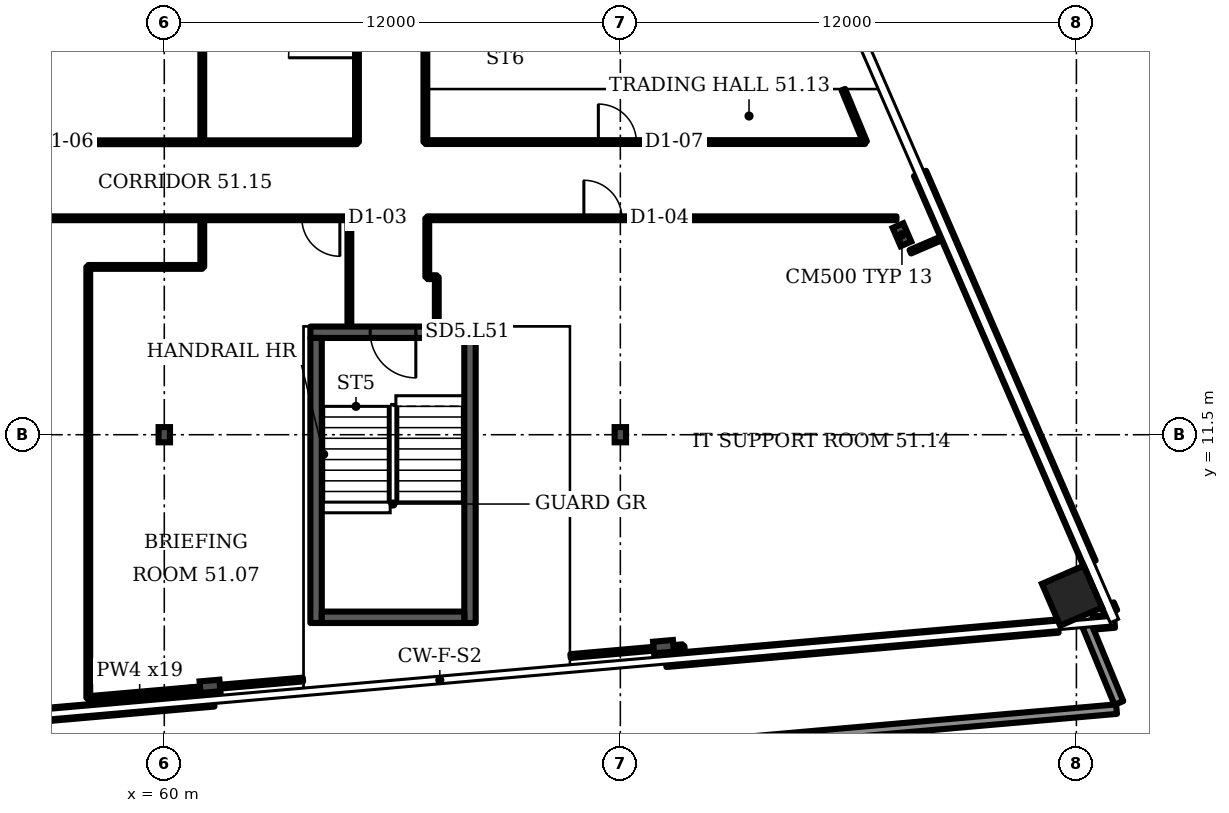
"""IFC4 building model, lengths in metres.
Left out: names, types, materials, properties, quantities, classifications, styles, units other than length and angle.
Written with IfcOpenShell. Run it as: python <this file> out.ifc"""

import sys

from ifc_helpers import new_model, si_unit, direction, frame, frame_2d, origin, origin_2d, place, context, subcontext, project, spatial, rectangle, i_section, extrude, element, fill, save


model = new_model("IFC4")
c1 = context("Model", 3, precision=1e-05, world=origin(), true_north=direction((0.0, 1.0)))
c2 = subcontext(c1, "Body", "Model", "MODEL_VIEW")
j1 = project(units=[si_unit("LENGTHUNIT", "METRE"), si_unit("PLANEANGLEUNIT", "RADIAN")], contexts=[c1])
p1 = place(None, origin())
s1 = spatial("IfcSite", under=j1, at=p1, CompositionType="ELEMENT")
p2 = place(p1, origin())
s2 = spatial("IfcBuilding", under=s1, at=p2, CompositionType="ELEMENT")
p3 = place(p2, frame((0.0, 0.0, 207.1)))
s3 = spatial("IfcBuildingStorey", under=s2, at=p3, CompositionType="ELEMENT", Elevation=207.1)
p4 = place(p3, frame((83.883, 7.265, 0.0), z_axis=(0.0, 0.0, 1.0), x_axis=(-0.398727, 0.917072, 0.0)))
e1 = element("IfcColumn", 1, at=p4, inside=s3, PredefinedType="COLUMN", context=c2, shape_type="SweptSolid", body=[
    extrude(rectangle(XDim=1.2, YDim=1.2, at=origin_2d()), origin(), (0.0, 0.0, 1.0), 3.6),
])
for number, where, z_axis, x_axis in (
    (2, (61.202, 4.879, 0.0), (0.0, 0.0, 1.0), (0.087, -0.996, 0.0)),
    (3, (73.135, 5.923, 0.0), (0.0, 0.0, 1.0), (0.087, -0.996, 0.0)),
    (4, (79.41, 16.762, 0.0), (0.0, 0.0, 1.0), (0.917, 0.399, 0.0)),
):
    element("IfcColumn", number, at=place(p3, frame(where, z_axis=z_axis, x_axis=x_axis)), inside=s3, PredefinedType="COLUMN", context=c2, shape_type="SweptSolid", body=[
        extrude(i_section(OverallWidth=0.306, OverallDepth=0.524, WebThickness=0.021, FlangeThickness=0.04, FilletRadius=0.027, at=origin_2d()), origin(), (0.0, 0.0, 1.0), 3.6),
    ])
for number, where, z_axis, x_axis in (
    (5, (60.0, 11.5, 0.0), (0.0, 0.0, 1.0), (1.0, 0.0, 0.0)),
    (6, (72.0, 11.5, 0.0), (0.0, 0.0, 1.0), (1.0, 0.0, 0.0)),
):
    element("IfcColumn", number, at=place(p3, frame(where, z_axis=z_axis, x_axis=x_axis)), inside=s3, PredefinedType="COLUMN", context=c2, shape_type="SweptSolid", body=[
        extrude(i_section(OverallWidth=0.3, OverallDepth=0.4, WebThickness=0.013, FlangeThickness=0.024, FilletRadius=0.027, at=origin_2d()), origin(), (0.0, 0.0, 1.0), 3.6),
    ])
p5 = place(p3, frame((85.056, 4.28, 0.0), z_axis=(0.0, 0.0, 1.0), x_axis=(-0.996197, -0.087157, 0.0)))
e7 = element("IfcWall", 7, at=p5, inside=s3, PredefinedType="PARAPET", context=c2, shape_type="SweptSolid", body=[
    extrude(rectangle(XDim=39.205, YDim=0.25, at=frame_2d((19.603, 0.0))), origin(), (0.0, 0.0, 1.0), 1.1),
])
p6 = place(p3, frame((84.239, 6.571, 0.0), z_axis=(0.0, 0.0, 1.0), x_axis=(0.381532, -0.924351, 0.0)))
e8 = element("IfcWall", 8, at=p6, inside=s3, PredefinedType="PARAPET", context=c2, shape_type="SweptSolid", body=[
    extrude(rectangle(XDim=2.302, YDim=0.25, at=frame_2d((1.151, 0.0))), origin(), (0.0, 0.0, 1.0), 1.1),
])
p7 = place(p3, frame((49.545, 3.493, 0.0), z_axis=(0.0, 0.0, 1.0), x_axis=(0.996196, 0.087141, 0.0)))
e9 = element("IfcWall", 9, at=p7, inside=s3, PredefinedType="SOLIDWALL", context=c2, shape_type="SweptSolid", body=[
    extrude(rectangle(XDim=11.803, YDim=0.35, at=frame_2d((5.902, 0.0))), origin(), (0.0, 0.0, 1.0), 1.0),
])
p8 = place(p3, frame((73.197, 5.562, 0.0), z_axis=(0.0, 0.0, 1.0), x_axis=(0.996198, 0.087163, 0.0)))
e10 = element("IfcWall", 10, at=p8, inside=s3, PredefinedType="SOLIDWALL", context=c2, shape_type="SweptSolid", body=[
    extrude(rectangle(XDim=10.358, YDim=0.35, at=frame_2d((5.179, 0.0))), origin(), (0.0, 0.0, 1.0), 1.0),
])
p9 = place(p3, frame((84.441, 6.546, 0.0), z_axis=(0.0, 0.0, 1.0), x_axis=(0.996207, 0.086967, 0.0)))
e11 = element("IfcWall", 11, at=p9, inside=s3, PredefinedType="SOLIDWALL", context=c2, shape_type="SweptSolid", body=[
    extrude(rectangle(XDim=0.562, YDim=0.35, at=frame_2d((0.281, 0.0))), origin(), (0.0, 0.0, 1.0), 1.0),
])
p10 = place(p3, frame((84.91, 6.819, 0.0), z_axis=(0.0, 0.0, 1.0), x_axis=(-0.398359, 0.91723, 0.0)))
e12 = element("IfcWall", 12, at=p10, inside=s3, PredefinedType="SOLIDWALL", context=c2, shape_type="SweptSolid", body=[
    extrude(rectangle(XDim=0.219, YDim=0.35, at=frame_2d((0.109, 0.0))), origin(), (0.0, 0.0, 1.0), 1.0),
])
p11 = place(p3, frame((84.345, 8.12, 0.0), z_axis=(0.0, 0.0, 1.0), x_axis=(-0.398721, 0.917067, 0.0)))
e13 = element("IfcWall", 13, at=p11, inside=s3, PredefinedType="SOLIDWALL", context=c2, shape_type="SweptSolid", body=[
    extrude(rectangle(XDim=11.182, YDim=0.35, at=frame_2d((5.591, 0.0))), origin(), (0.0, 0.0, 1.0), 1.0),
])
p12 = place(p3, frame((63.844, 14.196, 0.0), z_axis=(0.0, 0.0, 1.0), x_axis=(1.0, 0.0, 0.0)))
e14 = element("IfcWall", 14, at=p12, inside=s3, PredefinedType="SHEAR", context=c2, shape_type="SweptSolid", body=[
    extrude(rectangle(XDim=4.35, YDim=0.3, at=frame_2d((2.175, 0.0))), origin(), (0.0, 0.0, 1.0), 3.2),
])
p13 = place(p12, frame((1.575, 0.0, 0.0)))
e15 = element("IfcOpeningElement", 15, at=p13, cuts=e14, PredefinedType="OPENING", context=c2, shape_type="SweptSolid", body=[
    extrude(rectangle(XDim=1.2, YDim=2.1, at=frame_2d((0.6, 1.05))), frame((0.0, 0.16, 0.0), z_axis=(0.0, -1.0, 0.0), x_axis=(1.0, 0.0, 0.0)), (0.0, 0.0, 1.0), 0.32),
])
p14 = place(p3, frame((24.805, 19.195, 0.0), z_axis=(0.0, 0.0, 1.0), x_axis=(1.0, 0.0, 0.0)))
e16 = element("IfcWall", 16, at=p14, inside=s3, PredefinedType="PARTITIONING", context=c2, shape_type="SweptSolid", body=[
    extrude(rectangle(XDim=40.265, YDim=0.1, at=frame_2d((20.133, 0.0))), origin(), (0.0, 0.0, 1.0), 3.2),
])
p15 = place(p14, frame((4.945, 0.0, 0.0)))
e17 = element("IfcOpeningElement", 17, at=p15, cuts=e16, PredefinedType="OPENING", context=c2, shape_type="SweptSolid", body=[
    extrude(rectangle(XDim=1.0, YDim=2.1, at=frame_2d((0.5, 1.05))), frame((0.0, 0.06, 0.0), z_axis=(0.0, -1.0, 0.0), x_axis=(1.0, 0.0, 0.0)), (0.0, 0.0, 1.0), 0.12),
])
p16 = place(p14, frame((30.57, 0.0, 0.0)))
e18 = element("IfcOpeningElement", 18, at=p16, cuts=e16, PredefinedType="OPENING", context=c2, shape_type="SweptSolid", body=[
    extrude(rectangle(XDim=1.0, YDim=2.1, at=frame_2d((0.5, 1.05))), frame((0.0, 0.06, 0.0), z_axis=(0.0, -1.0, 0.0), x_axis=(1.0, 0.0, 0.0)), (0.0, 0.0, 1.0), 0.12),
])
p17 = place(p14, frame((16.02, 0.0, 0.0)))
e19 = element("IfcOpeningElement", 19, at=p17, cuts=e16, PredefinedType="OPENING", context=c2, shape_type="SweptSolid", body=[
    extrude(rectangle(XDim=1.1, YDim=2.1, at=frame_2d((0.55, 1.05))), frame((0.0, 0.06, 0.0), z_axis=(0.0, -1.0, 0.0), x_axis=(1.0, 0.0, 0.0)), (0.0, 0.0, 1.0), 0.12),
])
p18 = place(p3, frame((43.055, 17.195, 0.0), z_axis=(0.0, 0.0, 1.0), x_axis=(1.0, 0.0, 0.0)))
e20 = element("IfcWall", 20, at=p18, inside=s3, PredefinedType="PARTITIONING", context=c2, shape_type="SweptSolid", body=[
    extrude(rectangle(XDim=21.815, YDim=0.1, at=frame_2d((10.908, 0.0))), origin(), (0.0, 0.0, 1.0), 3.2),
])
p19 = place(p18, frame((6.115, 0.0, 0.0)))
e21 = element("IfcOpeningElement", 21, at=p19, cuts=e20, PredefinedType="OPENING", context=c2, shape_type="SweptSolid", body=[
    extrude(rectangle(XDim=1.8, YDim=2.1, at=frame_2d((0.9, 1.05))), frame((0.0, 0.06, 0.0), z_axis=(0.0, -1.0, 0.0), x_axis=(1.0, 0.0, 0.0)), (0.0, 0.0, 1.0), 0.12),
])
p20 = place(p18, frame((20.565, 0.0, 0.0)))
e22 = element("IfcOpeningElement", 22, at=p20, cuts=e20, PredefinedType="OPENING", context=c2, shape_type="SweptSolid", body=[
    extrude(rectangle(XDim=1.0, YDim=2.1, at=frame_2d((0.5, 1.05))), frame((0.0, 0.06, 0.0), z_axis=(0.0, -1.0, 0.0), x_axis=(1.0, 0.0, 0.0)), (0.0, 0.0, 1.0), 0.12),
])
p21 = place(p3, frame((58.0, 4.57, 0.0), z_axis=(0.0, 0.0, 1.0), x_axis=(0.996256, 0.086498, 0.0)))
e23 = element("IfcWall", 23, at=p21, inside=s3, PredefinedType="PARTITIONING", context=c2, shape_type="SweptSolid", body=[
    extrude(rectangle(XDim=2.715, YDim=0.1, at=frame_2d((1.358, 0.0))), origin(), (0.0, 0.0, 1.0), 2.58),
])
p22 = place(p3, frame((58.0, 4.575, 0.0), z_axis=(0.0, 0.0, 1.0), x_axis=(0.0, 1.0, 0.0)))
e24 = element("IfcWall", 24, at=p22, inside=s3, PredefinedType="PARTITIONING", context=c2, shape_type="SweptSolid", body=[
    extrude(rectangle(XDim=11.34, YDim=0.1, at=frame_2d((5.67, 0.0))), origin(), (0.0, 0.0, 1.0), 3.2),
])
p23 = place(p3, frame((58.0, 15.915, 0.0), z_axis=(0.0, 0.0, 1.0), x_axis=(1.0, 0.0, 0.0)))
e25 = element("IfcWall", 25, at=p23, inside=s3, PredefinedType="PARTITIONING", context=c2, shape_type="SweptSolid", body=[
    extrude(rectangle(XDim=3.0, YDim=0.1, at=frame_2d((1.5, 0.0))), origin(), (0.0, 0.0, 1.0), 3.2),
])
p24 = place(p3, frame((60.705, 4.805, 0.0), z_axis=(0.0, 0.0, 1.0), x_axis=(0.996324, 0.085692, 0.0)))
e26 = element("IfcWall", 26, at=p24, inside=s3, PredefinedType="PARTITIONING", context=c2, shape_type="SweptSolid", body=[
    extrude(rectangle(XDim=2.955, YDim=0.1, at=frame_2d((1.477, 0.0))), origin(), (0.0, 0.0, 1.0), 2.58),
])
p25 = place(p3, frame((60.733, 4.497, 0.0), z_axis=(0.0, 0.0, 1.0), x_axis=(-0.090037, 0.995936, 0.0)))
e27 = element("IfcWall", 27, at=p25, inside=s3, PredefinedType="PARTITIONING", context=c2, shape_type="SweptSolid", body=[
    extrude(rectangle(XDim=0.309, YDim=0.1, at=frame_2d((0.155, 0.0))), origin(), (0.0, 0.0, 1.0), 3.2),
])
p26 = place(p3, frame((61.0, 15.915, 0.0), z_axis=(0.0, 0.0, 1.0), x_axis=(0.0, 1.0, 0.0)))
e28 = element("IfcWall", 28, at=p26, inside=s3, PredefinedType="PARTITIONING", context=c2, shape_type="SweptSolid", body=[
    extrude(rectangle(XDim=1.28, YDim=0.1, at=frame_2d((0.64, 0.0))), origin(), (0.0, 0.0, 1.0), 3.2),
])
p27 = place(p3, frame((61.0, 19.2, 0.0), z_axis=(0.0, 0.0, 1.0), x_axis=(0.0, 1.0, 0.0)))
e29 = element("IfcWall", 29, at=p27, inside=s3, PredefinedType="PARTITIONING", context=c2, shape_type="SweptSolid", body=[
    extrude(rectangle(XDim=22.78, YDim=0.1, at=frame_2d((11.39, 0.0))), origin(), (0.0, 0.0, 1.0), 3.2),
])
p28 = place(p3, frame((64.87, 14.366, 0.0), z_axis=(0.0, 0.0, 1.0), x_axis=(0.0, 1.0, 0.0)))
e30 = element("IfcWall", 30, at=p28, inside=s3, PredefinedType="PARTITIONING", context=c2, shape_type="SweptSolid", body=[
    extrude(rectangle(XDim=2.829, YDim=0.1, at=frame_2d((1.415, 0.0))), origin(), (0.0, 0.0, 1.0), 3.2),
])
p29 = place(p3, frame((65.07, 19.2, 0.0), z_axis=(0.0, 0.0, 1.0), x_axis=(0.0, 1.0, 0.0)))
e31 = element("IfcWall", 31, at=p29, inside=s3, PredefinedType="PARTITIONING", context=c2, shape_type="SweptSolid", body=[
    extrude(rectangle(XDim=5.65, YDim=0.1, at=frame_2d((2.825, 0.0))), origin(), (0.0, 0.0, 1.0), 3.2),
])
p30 = place(p29, frame((2.219, 0.0, 0.0)))
e32 = element("IfcOpeningElement", 32, at=p30, cuts=e31, PredefinedType="OPENING", context=c2, shape_type="SweptSolid", body=[
    extrude(rectangle(XDim=1.8, YDim=2.1, at=frame_2d((0.9, 1.05))), frame((0.0, 0.06, 0.0), z_axis=(0.0, -1.0, 0.0), x_axis=(1.0, 0.0, 0.0)), (0.0, 0.0, 1.0), 0.12),
])
p31 = place(p3, frame((66.87, 19.2, 0.0), z_axis=(0.0, 0.0, 1.0), x_axis=(0.0, 1.0, 0.0)))
e33 = element("IfcWall", 33, at=p31, inside=s3, PredefinedType="PARTITIONING", context=c2, shape_type="SweptSolid", body=[
    extrude(rectangle(XDim=2.575, YDim=0.1, at=frame_2d((1.288, 0.0))), origin(), (0.0, 0.0, 1.0), 3.2),
])
p32 = place(p3, frame((66.87, 19.2, 0.0), z_axis=(0.0, 0.0, 1.0), x_axis=(1.0, 0.0, 0.0)))
e34 = element("IfcWall", 34, at=p32, inside=s3, PredefinedType="PARTITIONING", context=c2, shape_type="SweptSolid", body=[
    extrude(rectangle(XDim=11.57, YDim=0.1, at=frame_2d((5.785, 0.0))), origin(), (0.0, 0.0, 1.0), 3.2),
])
p33 = place(p32, frame((4.551, 0.0, 0.0)))
e35 = element("IfcOpeningElement", 35, at=p33, cuts=e34, PredefinedType="OPENING", context=c2, shape_type="SweptSolid", body=[
    extrude(rectangle(XDim=1.0, YDim=2.1, at=frame_2d((0.5, 1.05))), frame((0.0, 0.06, 0.0), z_axis=(0.0, -1.0, 0.0), x_axis=(1.0, 0.0, 0.0)), (0.0, 0.0, 1.0), 0.12),
])
p34 = place(p3, frame((66.92, 15.65, 0.0), z_axis=(0.0, 0.0, 1.0), x_axis=(0.0, 1.0, 0.0)))
e36 = element("IfcWall", 36, at=p34, inside=s3, PredefinedType="PARTITIONING", context=c2, shape_type="SweptSolid", body=[
    extrude(rectangle(XDim=1.545, YDim=0.1, at=frame_2d((0.772, 0.0))), origin(), (0.0, 0.0, 1.0), 3.2),
])
p35 = place(p3, frame((66.92, 17.195, 0.0), z_axis=(0.0, 0.0, 1.0), x_axis=(1.0, 0.0, 0.0)))
e37 = element("IfcWall", 37, at=p35, inside=s3, PredefinedType="PARTITIONING", context=c2, shape_type="SweptSolid", body=[
    extrude(rectangle(XDim=12.345, YDim=0.1, at=frame_2d((6.172, 0.0))), origin(), (0.0, 0.0, 1.0), 3.2),
])
p36 = place(p35, frame((4.12, 0.0, 0.0)))
e38 = element("IfcOpeningElement", 38, at=p36, cuts=e37, PredefinedType="OPENING", context=c2, shape_type="SweptSolid", body=[
    extrude(rectangle(XDim=1.0, YDim=2.1, at=frame_2d((0.5, 1.05))), frame((0.0, 0.06, 0.0), z_axis=(0.0, -1.0, 0.0), x_axis=(1.0, 0.0, 0.0)), (0.0, 0.0, 1.0), 0.12),
])
p37 = place(p3, frame((66.925, 15.645, 0.0), z_axis=(0.0, 0.0, 1.0), x_axis=(1.0, 0.0, 0.0)))
e39 = element("IfcWall", 39, at=p37, inside=s3, PredefinedType="PARTITIONING", context=c2, shape_type="SweptSolid", body=[
    extrude(rectangle(XDim=0.245, YDim=0.1, at=frame_2d((0.123, 0.0))), origin(), (0.0, 0.0, 1.0), 3.2),
])
p38 = place(p3, frame((67.17, 14.366, 0.0), z_axis=(0.0, 0.0, 1.0), x_axis=(0.0, 1.0, 0.0)))
e40 = element("IfcWall", 40, at=p38, inside=s3, PredefinedType="PARTITIONING", context=c2, shape_type="SweptSolid", body=[
    extrude(rectangle(XDim=1.279, YDim=0.1, at=frame_2d((0.639, 0.0))), origin(), (0.0, 0.0, 1.0), 3.2),
])
p39 = place(p3, frame((70.689, 5.677, 0.0), z_axis=(0.0, 0.0, 1.0), x_axis=(0.996174, 0.087417, 0.0)))
e41 = element("IfcWall", 41, at=p39, inside=s3, PredefinedType="PARTITIONING", context=c2, shape_type="SweptSolid", body=[
    extrude(rectangle(XDim=2.958, YDim=0.1, at=frame_2d((1.479, 0.0))), origin(), (0.0, 0.0, 1.0), 2.58),
])
p40 = place(p3, frame((73.663, 5.628, 0.0), z_axis=(0.0, 0.0, 1.0), x_axis=(-0.091893, 0.995772, 0.0)))
e42 = element("IfcWall", 42, at=p40, inside=s3, PredefinedType="PARTITIONING", context=c2, shape_type="SweptSolid", body=[
    extrude(rectangle(XDim=0.308, YDim=0.1, at=frame_2d((0.154, 0.0))), origin(), (0.0, 0.0, 1.0), 3.2),
])
p41 = place(p3, frame((78.44, 19.2, 0.0), z_axis=(0.0, 0.0, 1.0), x_axis=(-0.382605, 0.923907, 0.0)))
e43 = element("IfcWall", 43, at=p41, inside=s3, PredefinedType="PARTITIONING", context=c2, shape_type="SweptSolid", body=[
    extrude(rectangle(XDim=1.494, YDim=0.1, at=frame_2d((0.747, 0.0))), origin(), (0.0, 0.0, 1.0), 3.2),
])
p42 = place(p3, frame((79.63, 16.315, 0.0), z_axis=(0.0, 0.0, 1.0), x_axis=(0.918616, 0.395147, 0.0)))
e44 = element("IfcWall", 44, at=p42, inside=s3, PredefinedType="PARTITIONING", context=c2, shape_type="SweptSolid", body=[
    extrude(rectangle(XDim=1.031, YDim=0.1, at=frame_2d((0.516, 0.0))), origin(), (0.0, 0.0, 1.0), 2.58),
])
for number, where, z_axis, x_axis in (
    (45, (63.994, 6.546, 0.0), (0.0, 0.0, 1.0), (0.0, 1.0, 0.0)),
    (46, (68.044, 6.546, 0.0), (0.0, 0.0, 1.0), (0.0, 1.0, 0.0)),
):
    element("IfcWall", number, at=place(p3, frame(where, z_axis=z_axis, x_axis=x_axis)), inside=s3, PredefinedType="SHEAR", context=c2, shape_type="SweptSolid", body=[
        extrude(rectangle(XDim=7.5, YDim=0.3, at=frame_2d((3.75, 0.0))), origin(), (0.0, 0.0, 1.0), 3.2),
    ])
p43 = place(p3, frame((64.144, 6.696, 0.0), z_axis=(0.0, 0.0, 1.0), x_axis=(1.0, 0.0, 0.0)))
e47 = element("IfcWall", 47, at=p43, inside=s3, PredefinedType="SHEAR", context=c2, shape_type="SweptSolid", body=[
    extrude(rectangle(XDim=3.75, YDim=0.3, at=frame_2d((1.875, 0.0))), origin(), (0.0, 0.0, 1.0), 3.2),
])
p44 = place(p13, origin())
e48 = element("IfcDoor", 48, at=p44, inside=s3, OperationType="SINGLE_SWING_RIGHT", PredefinedType="DOOR", context=c2, shape_type="SweptSolid", body=[
    extrude(rectangle(XDim=1.2, YDim=2.1, at=frame_2d((0.6, 1.05))), frame((0.0, 0.025, 0.0), z_axis=(0.0, -1.0, 0.0), x_axis=(1.0, 0.0, 0.0)), (0.0, 0.0, 1.0), 0.05),
])
fill(e15, e48)
p45 = place(p20, origin())
e49 = element("IfcDoor", 49, at=p45, inside=s3, OperationType="SINGLE_SWING_RIGHT", PredefinedType="DOOR", context=c2, shape_type="SweptSolid", body=[
    extrude(rectangle(XDim=1.0, YDim=2.1, at=frame_2d((0.5, 1.05))), frame((0.0, 0.025, 0.0), z_axis=(0.0, -1.0, 0.0), x_axis=(1.0, 0.0, 0.0)), (0.0, 0.0, 1.0), 0.05),
])
fill(e22, e49)
p46 = place(p36, origin())
e50 = element("IfcDoor", 50, at=p46, inside=s3, OperationType="SINGLE_SWING_LEFT", PredefinedType="DOOR", context=c2, shape_type="SweptSolid", body=[
    extrude(rectangle(XDim=1.0, YDim=2.1, at=frame_2d((0.5, 1.05))), frame((0.0, 0.025, 0.0), z_axis=(0.0, -1.0, 0.0), x_axis=(1.0, 0.0, 0.0)), (0.0, 0.0, 1.0), 0.05),
])
fill(e38, e50)
p47 = place(p33, origin())
e51 = element("IfcDoor", 51, at=p47, inside=s3, OperationType="SINGLE_SWING_LEFT", PredefinedType="DOOR", context=c2, shape_type="SweptSolid", body=[
    extrude(rectangle(XDim=1.0, YDim=2.1, at=frame_2d((0.5, 1.05))), frame((0.0, 0.025, 0.0), z_axis=(0.0, -1.0, 0.0), x_axis=(1.0, 0.0, 0.0)), (0.0, 0.0, 1.0), 0.05),
])
fill(e35, e51)
p48 = place(p30, origin())
e52 = element("IfcDoor", 52, at=p48, inside=s3, OperationType="DOUBLE_DOOR_SINGLE_SWING", PredefinedType="DOOR", context=c2, shape_type="SweptSolid", body=[
    extrude(rectangle(XDim=1.8, YDim=2.1, at=frame_2d((0.9, 1.05))), frame((0.0, 0.025, 0.0), z_axis=(0.0, -1.0, 0.0), x_axis=(1.0, 0.0, 0.0)), (0.0, 0.0, 1.0), 0.05),
])
fill(e32, e52)
save(model, sys.argv[1])
